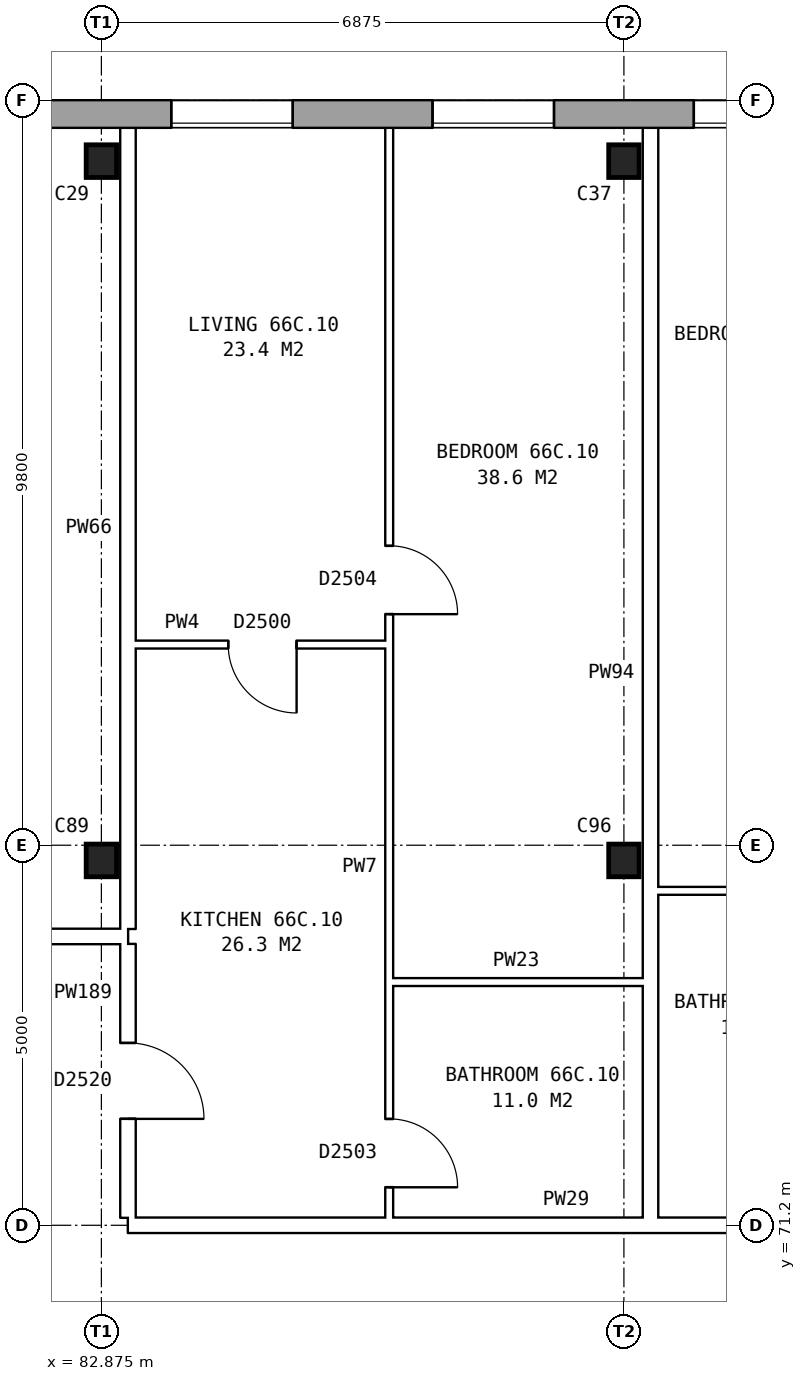
"""IFC4 building model, lengths in metres.
Left out: names, types, materials, properties, quantities, classifications, styles, units other than length and angle.
Written with IfcOpenShell. Run it as: python <this file> out.ifc"""

import sys

from ifc_helpers import new_model, si_unit, direction, frame, frame_2d, origin, origin_2d, place, context, subcontext, project, spatial, rectangle, i_section, extrude, element, fill, save


model = new_model("IFC4")
c1 = context("Model", 3, precision=1e-05, world=origin(), true_north=direction((0.0, 1.0)))
c2 = subcontext(c1, "Body", "Model", "MODEL_VIEW")
j1 = project(units=[si_unit("LENGTHUNIT", "METRE"), si_unit("PLANEANGLEUNIT", "RADIAN")], contexts=[c1])
p1 = place(None, origin())
s1 = spatial("IfcSite", under=j1, at=p1, CompositionType="ELEMENT")
p2 = place(p1, origin())
s2 = spatial("IfcBuilding", under=s1, at=p2, CompositionType="ELEMENT")
p3 = place(p2, frame((0.0, 0.0, 233.8)))
s3 = spatial("IfcBuildingStorey", under=s2, at=p3, CompositionType="ELEMENT", Elevation=233.8)
for number, where, z_axis, x_axis in (
    (1, (82.875, 76.0, 0.0), (0.0, 0.0, 1.0), (1.0, 0.0, 0.0)),
    (2, (89.75, 76.0, 0.0), (0.0, 0.0, 1.0), (1.0, 0.0, 0.0)),
    (3, (82.875, 85.2, 0.0), (0.0, 0.0, 1.0), (1.0, 0.0, 0.0)),
    (4, (89.75, 85.2, 0.0), (0.0, 0.0, 1.0), (1.0, 0.0, 0.0)),
):
    element("IfcColumn", number, at=place(p3, frame(where, z_axis=z_axis, x_axis=x_axis)), inside=s3, PredefinedType="COLUMN", context=c2, shape_type="SweptSolid", body=[
        extrude(i_section(OverallWidth=0.4, OverallDepth=0.43, WebThickness=0.028, FlangeThickness=0.04, at=origin_2d()), origin(), (0.0, 0.0, 1.0), 2.85),
    ])
p4 = place(p3, frame((131.05, 85.82, 0.0), z_axis=(0.0, 0.0, 1.0), x_axis=(-1.0, 0.0, 0.0)))
e5 = element("IfcWall", 5, at=p4, inside=s3, PredefinedType="STANDARD", context=c2, shape_type="SweptSolid", body=[
    extrude(rectangle(XDim=55.1, YDim=0.36, at=frame_2d((27.55, 0.0))), origin(), (0.0, 0.0, 1.0), 2.85),
])
p5 = place(p4, frame((0.969, 0.0, 0.8)))
e6 = element("IfcOpeningElement", 6, at=p5, cuts=e5, PredefinedType="OPENING", context=c2, shape_type="SweptSolid", body=[
    extrude(rectangle(XDim=1.6, YDim=1.8, at=frame_2d((0.8, 0.9))), frame((0.0, 0.19, 0.0), z_axis=(0.0, -1.0, 0.0), x_axis=(1.0, 0.0, 0.0)), (0.0, 0.0, 1.0), 0.38),
])
p6 = place(p4, frame((4.406, 0.0, 0.8)))
e7 = element("IfcOpeningElement", 7, at=p6, cuts=e5, PredefinedType="OPENING", context=c2, shape_type="SweptSolid", body=[
    extrude(rectangle(XDim=1.6, YDim=1.8, at=frame_2d((0.8, 0.9))), frame((0.0, 0.19, 0.0), z_axis=(0.0, -1.0, 0.0), x_axis=(1.0, 0.0, 0.0)), (0.0, 0.0, 1.0), 0.38),
])
p7 = place(p4, frame((7.844, 0.0, 0.8)))
e8 = element("IfcOpeningElement", 8, at=p7, cuts=e5, PredefinedType="OPENING", context=c2, shape_type="SweptSolid", body=[
    extrude(rectangle(XDim=1.6, YDim=1.8, at=frame_2d((0.8, 0.9))), frame((0.0, 0.19, 0.0), z_axis=(0.0, -1.0, 0.0), x_axis=(1.0, 0.0, 0.0)), (0.0, 0.0, 1.0), 0.38),
])
p8 = place(p4, frame((11.281, 0.0, 0.8)))
e9 = element("IfcOpeningElement", 9, at=p8, cuts=e5, PredefinedType="OPENING", context=c2, shape_type="SweptSolid", body=[
    extrude(rectangle(XDim=1.6, YDim=1.8, at=frame_2d((0.8, 0.9))), frame((0.0, 0.19, 0.0), z_axis=(0.0, -1.0, 0.0), x_axis=(1.0, 0.0, 0.0)), (0.0, 0.0, 1.0), 0.38),
])
p9 = place(p4, frame((14.719, 0.0, 0.8)))
e10 = element("IfcOpeningElement", 10, at=p9, cuts=e5, PredefinedType="OPENING", context=c2, shape_type="SweptSolid", body=[
    extrude(rectangle(XDim=1.6, YDim=1.8, at=frame_2d((0.8, 0.9))), frame((0.0, 0.19, 0.0), z_axis=(0.0, -1.0, 0.0), x_axis=(1.0, 0.0, 0.0)), (0.0, 0.0, 1.0), 0.38),
])
p10 = place(p4, frame((18.156, 0.0, 0.8)))
e11 = element("IfcOpeningElement", 11, at=p10, cuts=e5, PredefinedType="OPENING", context=c2, shape_type="SweptSolid", body=[
    extrude(rectangle(XDim=1.6, YDim=1.8, at=frame_2d((0.8, 0.9))), frame((0.0, 0.19, 0.0), z_axis=(0.0, -1.0, 0.0), x_axis=(1.0, 0.0, 0.0)), (0.0, 0.0, 1.0), 0.38),
])
p11 = place(p4, frame((21.594, 0.0, 0.8)))
e12 = element("IfcOpeningElement", 12, at=p11, cuts=e5, PredefinedType="OPENING", context=c2, shape_type="SweptSolid", body=[
    extrude(rectangle(XDim=1.6, YDim=1.8, at=frame_2d((0.8, 0.9))), frame((0.0, 0.19, 0.0), z_axis=(0.0, -1.0, 0.0), x_axis=(1.0, 0.0, 0.0)), (0.0, 0.0, 1.0), 0.38),
])
p12 = place(p4, frame((25.031, 0.0, 0.8)))
e13 = element("IfcOpeningElement", 13, at=p12, cuts=e5, PredefinedType="OPENING", context=c2, shape_type="SweptSolid", body=[
    extrude(rectangle(XDim=1.6, YDim=1.8, at=frame_2d((0.8, 0.9))), frame((0.0, 0.19, 0.0), z_axis=(0.0, -1.0, 0.0), x_axis=(1.0, 0.0, 0.0)), (0.0, 0.0, 1.0), 0.38),
])
p13 = place(p4, frame((28.469, 0.0, 0.8)))
e14 = element("IfcOpeningElement", 14, at=p13, cuts=e5, PredefinedType="OPENING", context=c2, shape_type="SweptSolid", body=[
    extrude(rectangle(XDim=1.6, YDim=1.8, at=frame_2d((0.8, 0.9))), frame((0.0, 0.19, 0.0), z_axis=(0.0, -1.0, 0.0), x_axis=(1.0, 0.0, 0.0)), (0.0, 0.0, 1.0), 0.38),
])
p14 = place(p4, frame((31.906, 0.0, 0.8)))
e15 = element("IfcOpeningElement", 15, at=p14, cuts=e5, PredefinedType="OPENING", context=c2, shape_type="SweptSolid", body=[
    extrude(rectangle(XDim=1.6, YDim=1.8, at=frame_2d((0.8, 0.9))), frame((0.0, 0.19, 0.0), z_axis=(0.0, -1.0, 0.0), x_axis=(1.0, 0.0, 0.0)), (0.0, 0.0, 1.0), 0.38),
])
p15 = place(p4, frame((35.344, 0.0, 0.8)))
e16 = element("IfcOpeningElement", 16, at=p15, cuts=e5, PredefinedType="OPENING", context=c2, shape_type="SweptSolid", body=[
    extrude(rectangle(XDim=1.6, YDim=1.8, at=frame_2d((0.8, 0.9))), frame((0.0, 0.19, 0.0), z_axis=(0.0, -1.0, 0.0), x_axis=(1.0, 0.0, 0.0)), (0.0, 0.0, 1.0), 0.38),
])
p16 = place(p4, frame((38.781, 0.0, 0.8)))
e17 = element("IfcOpeningElement", 17, at=p16, cuts=e5, PredefinedType="OPENING", context=c2, shape_type="SweptSolid", body=[
    extrude(rectangle(XDim=1.6, YDim=1.8, at=frame_2d((0.8, 0.9))), frame((0.0, 0.19, 0.0), z_axis=(0.0, -1.0, 0.0), x_axis=(1.0, 0.0, 0.0)), (0.0, 0.0, 1.0), 0.38),
])
p17 = place(p4, frame((42.219, 0.0, 0.8)))
e18 = element("IfcOpeningElement", 18, at=p17, cuts=e5, PredefinedType="OPENING", context=c2, shape_type="SweptSolid", body=[
    extrude(rectangle(XDim=1.6, YDim=1.8, at=frame_2d((0.8, 0.9))), frame((0.0, 0.19, 0.0), z_axis=(0.0, -1.0, 0.0), x_axis=(1.0, 0.0, 0.0)), (0.0, 0.0, 1.0), 0.38),
])
p18 = place(p4, frame((45.656, 0.0, 0.8)))
e19 = element("IfcOpeningElement", 19, at=p18, cuts=e5, PredefinedType="OPENING", context=c2, shape_type="SweptSolid", body=[
    extrude(rectangle(XDim=1.6, YDim=1.8, at=frame_2d((0.8, 0.9))), frame((0.0, 0.19, 0.0), z_axis=(0.0, -1.0, 0.0), x_axis=(1.0, 0.0, 0.0)), (0.0, 0.0, 1.0), 0.38),
])
p19 = place(p4, frame((49.094, 0.0, 0.8)))
e20 = element("IfcOpeningElement", 20, at=p19, cuts=e5, PredefinedType="OPENING", context=c2, shape_type="SweptSolid", body=[
    extrude(rectangle(XDim=1.6, YDim=1.8, at=frame_2d((0.8, 0.9))), frame((0.0, 0.19, 0.0), z_axis=(0.0, -1.0, 0.0), x_axis=(1.0, 0.0, 0.0)), (0.0, 0.0, 1.0), 0.38),
])
p20 = place(p4, frame((52.531, 0.0, 0.8)))
e21 = element("IfcOpeningElement", 21, at=p20, cuts=e5, PredefinedType="OPENING", context=c2, shape_type="SweptSolid", body=[
    extrude(rectangle(XDim=1.6, YDim=1.8, at=frame_2d((0.8, 0.9))), frame((0.0, 0.19, 0.0), z_axis=(0.0, -1.0, 0.0), x_axis=(1.0, 0.0, 0.0)), (0.0, 0.0, 1.0), 0.38),
])
p21 = place(p3, frame((83.225, 71.2, 0.0), z_axis=(0.0, 0.0, 1.0), x_axis=(1.0, 0.0, 0.0)))
e22 = element("IfcWall", 22, at=p21, inside=s3, PredefinedType="PARTITIONING", context=c2, shape_type="SweptSolid", body=[
    extrude(rectangle(XDim=41.25, YDim=0.2, at=frame_2d((20.625, 0.0))), origin(), (0.0, 0.0, 1.0), 2.85),
])
p22 = place(p21, frame((11.531, 0.0, 0.0)))
e23 = element("IfcOpeningElement", 23, at=p22, cuts=e22, PredefinedType="OPENING", context=c2, shape_type="SweptSolid", body=[
    extrude(rectangle(XDim=1.0, YDim=2.1, at=frame_2d((0.5, 1.05))), frame((0.0, 0.11, 0.0), z_axis=(0.0, -1.0, 0.0), x_axis=(1.0, 0.0, 0.0)), (0.0, 0.0, 1.0), 0.22),
])
p23 = place(p21, frame((21.844, 0.0, 0.0)))
e24 = element("IfcOpeningElement", 24, at=p23, cuts=e22, PredefinedType="OPENING", context=c2, shape_type="SweptSolid", body=[
    extrude(rectangle(XDim=1.0, YDim=2.1, at=frame_2d((0.5, 1.05))), frame((0.0, 0.11, 0.0), z_axis=(0.0, -1.0, 0.0), x_axis=(1.0, 0.0, 0.0)), (0.0, 0.0, 1.0), 0.22),
])
p24 = place(p21, frame((32.156, 0.0, 0.0)))
e25 = element("IfcOpeningElement", 25, at=p24, cuts=e22, PredefinedType="OPENING", context=c2, shape_type="SweptSolid", body=[
    extrude(rectangle(XDim=1.0, YDim=2.1, at=frame_2d((0.5, 1.05))), frame((0.0, 0.11, 0.0), z_axis=(0.0, -1.0, 0.0), x_axis=(1.0, 0.0, 0.0)), (0.0, 0.0, 1.0), 0.22),
])
p25 = place(p3, frame((86.662, 74.4, 0.0), z_axis=(0.0, 0.0, 1.0), x_axis=(1.0, 0.0, 0.0)))
e26 = element("IfcWall", 26, at=p25, inside=s3, PredefinedType="PARTITIONING", context=c2, shape_type="SweptSolid", body=[
    extrude(rectangle(XDim=3.338, YDim=0.1, at=frame_2d((1.669, 0.0))), origin(), (0.0, 0.0, 1.0), 2.85),
])
p26 = place(p3, frame((75.64, 75.0, 0.0), z_axis=(0.0, 0.0, 1.0), x_axis=(1.0, 0.0, 0.0)))
e27 = element("IfcWall", 27, at=p26, inside=s3, PredefinedType="PARTITIONING", context=c2, shape_type="SweptSolid", body=[
    extrude(rectangle(XDim=7.585, YDim=0.2, at=frame_2d((3.792, 0.0))), origin(), (0.0, 0.0, 1.0), 2.85),
])
p27 = place(p26, frame((3.343, 0.0, 0.0)))
e28 = element("IfcOpeningElement", 28, at=p27, cuts=e27, PredefinedType="OPENING", context=c2, shape_type="SweptSolid", body=[
    extrude(rectangle(XDim=0.9, YDim=2.1, at=frame_2d((0.45, 1.05))), frame((0.0, 0.11, 0.0), z_axis=(0.0, -1.0, 0.0), x_axis=(1.0, 0.0, 0.0)), (0.0, 0.0, 1.0), 0.22),
])
p28 = place(p3, frame((90.2, 75.6, 0.0), z_axis=(0.0, 0.0, 1.0), x_axis=(1.0, 0.0, 0.0)))
e29 = element("IfcWall", 29, at=p28, inside=s3, PredefinedType="PARTITIONING", context=c2, shape_type="SweptSolid", body=[
    extrude(rectangle(XDim=3.337, YDim=0.1, at=frame_2d((1.668, 0.0))), origin(), (0.0, 0.0, 1.0), 2.85),
])
p29 = place(p3, frame((83.325, 78.84, 0.0), z_axis=(0.0, 0.0, 1.0), x_axis=(1.0, 0.0, 0.0)))
e30 = element("IfcWall", 30, at=p29, inside=s3, PredefinedType="PARTITIONING", context=c2, shape_type="SweptSolid", body=[
    extrude(rectangle(XDim=3.337, YDim=0.1, at=frame_2d((1.668, 0.0))), origin(), (0.0, 0.0, 1.0), 2.85),
])
p30 = place(p29, frame((1.219, 0.0, 0.0)))
e31 = element("IfcOpeningElement", 31, at=p30, cuts=e30, PredefinedType="OPENING", context=c2, shape_type="SweptSolid", body=[
    extrude(rectangle(XDim=0.9, YDim=2.1, at=frame_2d((0.45, 1.05))), frame((0.0, 0.06, 0.0), z_axis=(0.0, -1.0, 0.0), x_axis=(1.0, 0.0, 0.0)), (0.0, 0.0, 1.0), 0.12),
])
p31 = place(p3, frame((83.225, 71.3, 0.0), z_axis=(0.0, 0.0, 1.0), x_axis=(0.0, 1.0, 0.0)))
e32 = element("IfcWall", 32, at=p31, inside=s3, PredefinedType="PARTITIONING", context=c2, shape_type="SweptSolid", body=[
    extrude(rectangle(XDim=3.6, YDim=0.2, at=frame_2d((1.8, 0.0))), origin(), (0.0, 0.0, 1.0), 2.85),
])
p32 = place(p31, frame((1.3, 0.0, 0.0)))
e33 = element("IfcOpeningElement", 33, at=p32, cuts=e32, PredefinedType="OPENING", context=c2, shape_type="SweptSolid", body=[
    extrude(rectangle(XDim=1.0, YDim=2.1, at=frame_2d((0.5, 1.05))), frame((0.0, 0.11, 0.0), z_axis=(0.0, -1.0, 0.0), x_axis=(1.0, 0.0, 0.0)), (0.0, 0.0, 1.0), 0.22),
])
p33 = place(p3, frame((83.225, 75.1, 0.0), z_axis=(0.0, 0.0, 1.0), x_axis=(0.0, 1.0, 0.0)))
e34 = element("IfcWall", 34, at=p33, inside=s3, PredefinedType="PARTITIONING", context=c2, shape_type="SweptSolid", body=[
    extrude(rectangle(XDim=10.54, YDim=0.2, at=frame_2d((5.27, 0.0))), origin(), (0.0, 0.0, 1.0), 2.85),
])
p34 = place(p3, frame((86.662, 71.3, 0.0), z_axis=(0.0, 0.0, 1.0), x_axis=(0.0, 1.0, 0.0)))
e35 = element("IfcWall", 35, at=p34, inside=s3, PredefinedType="PARTITIONING", context=c2, shape_type="SweptSolid", body=[
    extrude(rectangle(XDim=14.34, YDim=0.1, at=frame_2d((7.17, 0.0))), origin(), (0.0, 0.0, 1.0), 2.85),
])
p35 = place(p34, frame((7.94, 0.0, 0.0)))
e36 = element("IfcOpeningElement", 36, at=p35, cuts=e35, PredefinedType="OPENING", context=c2, shape_type="SweptSolid", body=[
    extrude(rectangle(XDim=0.9, YDim=2.1, at=frame_2d((0.45, 1.05))), frame((0.0, 0.06, 0.0), z_axis=(0.0, -1.0, 0.0), x_axis=(1.0, 0.0, 0.0)), (0.0, 0.0, 1.0), 0.12),
])
p36 = place(p34, frame((0.4, 0.0, 0.0)))
e37 = element("IfcOpeningElement", 37, at=p36, cuts=e35, PredefinedType="OPENING", context=c2, shape_type="SweptSolid", body=[
    extrude(rectangle(XDim=0.9, YDim=2.1, at=frame_2d((0.45, 1.05))), frame((0.0, 0.06, 0.0), z_axis=(0.0, -1.0, 0.0), x_axis=(1.0, 0.0, 0.0)), (0.0, 0.0, 1.0), 0.12),
])
p37 = place(p3, frame((90.1, 71.3, 0.0), z_axis=(0.0, 0.0, 1.0), x_axis=(0.0, 1.0, 0.0)))
e38 = element("IfcWall", 38, at=p37, inside=s3, PredefinedType="PARTITIONING", context=c2, shape_type="SweptSolid", body=[
    extrude(rectangle(XDim=14.34, YDim=0.2, at=frame_2d((7.17, 0.0))), origin(), (0.0, 0.0, 1.0), 2.85),
])
p38 = place(p16, origin())
e39 = element("IfcWindow", 39, at=p38, inside=s3, PartitioningType="SINGLE_PANEL", PredefinedType="WINDOW", context=c2, shape_type="SweptSolid", body=[
    extrude(rectangle(XDim=1.6, YDim=1.8, at=frame_2d((0.8, 0.9))), frame((0.0, 0.15, 0.0), z_axis=(0.0, -1.0, 0.0), x_axis=(1.0, 0.0, 0.0)), (0.0, 0.0, 1.0), 0.06),
])
fill(e17, e39)
p39 = place(p17, origin())
e40 = element("IfcWindow", 40, at=p39, inside=s3, PartitioningType="SINGLE_PANEL", PredefinedType="WINDOW", context=c2, shape_type="SweptSolid", body=[
    extrude(rectangle(XDim=1.6, YDim=1.8, at=frame_2d((0.8, 0.9))), frame((0.0, 0.15, 0.0), z_axis=(0.0, -1.0, 0.0), x_axis=(1.0, 0.0, 0.0)), (0.0, 0.0, 1.0), 0.06),
])
fill(e18, e40)
p40 = place(p18, origin())
e41 = element("IfcWindow", 41, at=p40, inside=s3, PartitioningType="SINGLE_PANEL", PredefinedType="WINDOW", context=c2, shape_type="SweptSolid", body=[
    extrude(rectangle(XDim=1.6, YDim=1.8, at=frame_2d((0.8, 0.9))), frame((0.0, 0.15, 0.0), z_axis=(0.0, -1.0, 0.0), x_axis=(1.0, 0.0, 0.0)), (0.0, 0.0, 1.0), 0.06),
])
fill(e19, e41)
p41 = place(p35, frame((0.9, 0.0, 0.0), z_axis=(0.0, 0.0, 1.0), x_axis=(-1.0, 0.0, 0.0)))
e42 = element("IfcDoor", 42, at=p41, inside=s3, OperationType="SINGLE_SWING_RIGHT", PredefinedType="DOOR", context=c2, shape_type="SweptSolid", body=[
    extrude(rectangle(XDim=0.9, YDim=2.1, at=frame_2d((0.45, 1.05))), frame((0.0, 0.025, 0.0), z_axis=(0.0, -1.0, 0.0), x_axis=(1.0, 0.0, 0.0)), (0.0, 0.0, 1.0), 0.05),
])
fill(e36, e42)
p42 = place(p32, frame((1.0, 0.0, 0.0), z_axis=(0.0, 0.0, 1.0), x_axis=(-1.0, 0.0, 0.0)))
e43 = element("IfcDoor", 43, at=p42, inside=s3, OperationType="SINGLE_SWING_RIGHT", PredefinedType="DOOR", context=c2, shape_type="SweptSolid", body=[
    extrude(rectangle(XDim=1.0, YDim=2.1, at=frame_2d((0.5, 1.05))), frame((0.0, 0.025, 0.0), z_axis=(0.0, -1.0, 0.0), x_axis=(1.0, 0.0, 0.0)), (0.0, 0.0, 1.0), 0.05),
])
fill(e33, e43)
p43 = place(p30, frame((0.9, 0.0, 0.0), z_axis=(0.0, 0.0, 1.0), x_axis=(-1.0, 0.0, 0.0)))
e44 = element("IfcDoor", 44, at=p43, inside=s3, OperationType="SINGLE_SWING_LEFT", PredefinedType="DOOR", context=c2, shape_type="SweptSolid", body=[
    extrude(rectangle(XDim=0.9, YDim=2.1, at=frame_2d((0.45, 1.05))), frame((0.0, 0.025, 0.0), z_axis=(0.0, -1.0, 0.0), x_axis=(1.0, 0.0, 0.0)), (0.0, 0.0, 1.0), 0.05),
])
fill(e31, e44)
p44 = place(p36, frame((0.9, 0.0, 0.0), z_axis=(0.0, 0.0, 1.0), x_axis=(-1.0, 0.0, 0.0)))
e45 = element("IfcDoor", 45, at=p44, inside=s3, OperationType="SINGLE_SWING_RIGHT", PredefinedType="DOOR", context=c2, shape_type="SweptSolid", body=[
    extrude(rectangle(XDim=0.9, YDim=2.1, at=frame_2d((0.45, 1.05))), frame((0.0, 0.025, 0.0), z_axis=(0.0, -1.0, 0.0), x_axis=(1.0, 0.0, 0.0)), (0.0, 0.0, 1.0), 0.05),
])
fill(e37, e45)
save(model, sys.argv[1])
